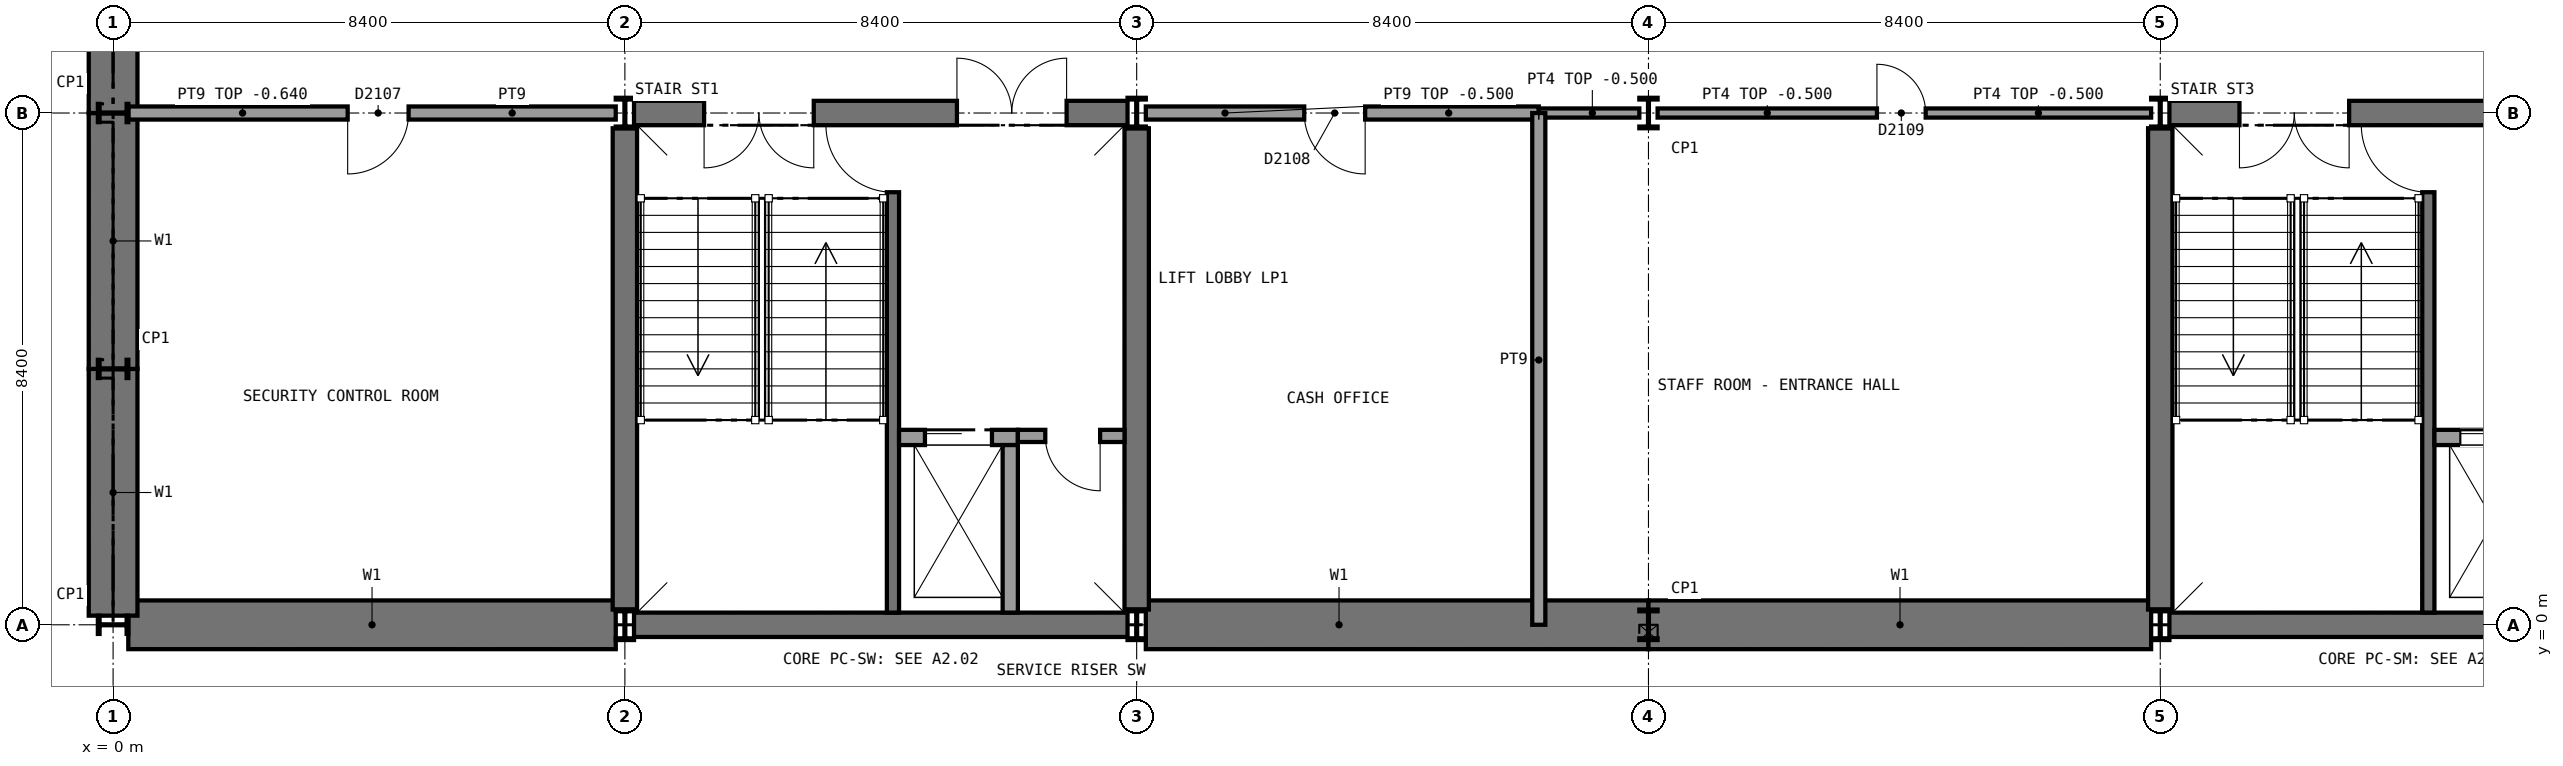
"""IFC4 building model, lengths in metres.
Left out: names, types, materials, properties, quantities, classifications, styles, units other than length and angle.
Written with IfcOpenShell. Run it as: python <this file> out.ifc"""

import sys

from ifc_helpers import new_model, si_unit, direction, frame, frame_2d, origin, origin_2d, place, context, subcontext, project, spatial, rectangle, i_section, extrude, element, fill, save


model = new_model("IFC4")
c1 = context("Model", 3, precision=1e-05, world=origin(), true_north=direction((0.0, 1.0)))
c2 = subcontext(c1, "Body", "Model", "MODEL_VIEW")
j1 = project(units=[si_unit("LENGTHUNIT", "METRE"), si_unit("PLANEANGLEUNIT", "RADIAN")], contexts=[c1])
p1 = place(None, origin())
s1 = spatial("IfcSite", under=j1, at=p1, CompositionType="ELEMENT")
p2 = place(p1, origin())
s2 = spatial("IfcBuilding", under=s1, at=p2, CompositionType="ELEMENT")
p3 = place(p2, frame((0.0, 0.0, -4.9)))
s3 = spatial("IfcBuildingStorey", under=s2, at=p3, CompositionType="ELEMENT", Elevation=-4.9)
p4 = place(p3, frame((0.25, 0.0, 0.0), z_axis=(0.0, 0.0, 1.0), x_axis=(1.0, 0.0, 0.0)))
e1 = element("IfcWall", 1, at=p4, inside=s3, PredefinedType="SOLIDWALL", context=c2, shape_type="SweptSolid", body=[
    extrude(rectangle(XDim=8.0, YDim=0.8, at=frame_2d((4.0, 0.0))), origin(), (0.0, 0.0, 1.0), 4.75),
])
p5 = place(p3, frame((16.95, 0.0, 0.0), z_axis=(0.0, 0.0, 1.0), x_axis=(1.0, 0.0, 0.0)))
e2 = element("IfcWall", 2, at=p5, inside=s3, PredefinedType="SOLIDWALL", context=c2, shape_type="SweptSolid", body=[
    extrude(rectangle(XDim=8.25, YDim=0.8, at=frame_2d((4.125, 0.0))), origin(), (0.0, 0.0, 1.0), 4.75),
])
p6 = place(p3, frame((25.2, 0.0, 0.0), z_axis=(0.0, 0.0, 1.0), x_axis=(1.0, 0.0, 0.0)))
e3 = element("IfcWall", 3, at=p6, inside=s3, PredefinedType="SOLIDWALL", context=c2, shape_type="SweptSolid", body=[
    extrude(rectangle(XDim=8.25, YDim=0.8, at=frame_2d((4.125, 0.0))), origin(), (0.0, 0.0, 1.0), 4.75),
])
p7 = place(p3, frame((0.0, 0.15, 0.0), z_axis=(0.0, 0.0, 1.0), x_axis=(0.0, 1.0, 0.0)))
e4 = element("IfcWall", 4, at=p7, inside=s3, PredefinedType="SOLIDWALL", context=c2, shape_type="SweptSolid", body=[
    extrude(rectangle(XDim=4.05, YDim=0.8, at=frame_2d((2.025, 0.0))), origin(), (0.0, 0.0, 1.0), 4.75),
])
p8 = place(p3, frame((0.0, 4.2, 0.0), z_axis=(0.0, 0.0, 1.0), x_axis=(0.0, 1.0, 0.0)))
e5 = element("IfcWall", 5, at=p8, inside=s3, PredefinedType="SOLIDWALL", context=c2, shape_type="SweptSolid", body=[
    extrude(rectangle(XDim=4.2, YDim=0.8, at=frame_2d((2.1, 0.0))), origin(), (0.0, 0.0, 1.0), 4.75),
])
p9 = place(p3, frame((0.0, 8.4, 0.0), z_axis=(0.0, 0.0, 1.0), x_axis=(0.0, 1.0, 0.0)))
e6 = element("IfcWall", 6, at=p9, inside=s3, PredefinedType="SOLIDWALL", context=c2, shape_type="SweptSolid", body=[
    extrude(rectangle(XDim=4.2, YDim=0.8, at=frame_2d((2.1, 0.0))), origin(), (0.0, 0.0, 1.0), 4.75),
])
p10 = place(p3, frame((8.55, 0.0, 0.0), z_axis=(0.0, 0.0, 1.0), x_axis=(1.0, 0.0, 0.0)))
e7 = element("IfcWall", 7, at=p10, inside=s3, PredefinedType="SHEAR", context=c2, shape_type="SweptSolid", body=[
    extrude(rectangle(XDim=8.1, YDim=0.4, at=frame_2d((4.05, 0.0))), origin(), (0.0, 0.0, 1.0), 4.75),
])
p11 = place(p3, frame((8.55, 8.4, 0.0), z_axis=(0.0, 0.0, 1.0), x_axis=(1.0, 0.0, 0.0)))
e8 = element("IfcWall", 8, at=p11, inside=s3, PredefinedType="SHEAR", context=c2, shape_type="SweptSolid", body=[
    extrude(rectangle(XDim=8.1, YDim=0.4, at=frame_2d((4.05, 0.0))), origin(), (0.0, 0.0, 1.0), 4.75),
])
p12 = place(p11, frame((1.15, 0.0, 0.0)))
e9 = element("IfcOpeningElement", 9, at=p12, cuts=e8, PredefinedType="OPENING", context=c2, shape_type="SweptSolid", body=[
    extrude(rectangle(XDim=1.8, YDim=2.1, at=frame_2d((0.9, 1.05))), frame((0.0, 0.21, 0.0), z_axis=(0.0, -1.0, 0.0), x_axis=(1.0, 0.0, 0.0)), (0.0, 0.0, 1.0), 0.42),
])
p13 = place(p11, frame((5.3, 0.0, 0.0)))
e10 = element("IfcOpeningElement", 10, at=p13, cuts=e8, PredefinedType="OPENING", context=c2, shape_type="SweptSolid", body=[
    extrude(rectangle(XDim=1.8, YDim=2.1, at=frame_2d((0.9, 1.05))), frame((0.0, 0.21, 0.0), z_axis=(0.0, -1.0, 0.0), x_axis=(1.0, 0.0, 0.0)), (0.0, 0.0, 1.0), 0.42),
])
for number, where, z_axis, x_axis in (
    (11, (8.4, 0.25, 0.0), (0.0, 0.0, 1.0), (0.0, 1.0, 0.0)),
    (12, (16.8, 0.25, 0.0), (0.0, 0.0, 1.0), (0.0, 1.0, 0.0)),
):
    element("IfcWall", number, at=place(p3, frame(where, z_axis=z_axis, x_axis=x_axis)), inside=s3, PredefinedType="SHEAR", context=c2, shape_type="SweptSolid", body=[
        extrude(rectangle(XDim=7.9, YDim=0.4, at=frame_2d((3.95, 0.0))), origin(), (0.0, 0.0, 1.0), 4.75),
    ])
p14 = place(p3, frame((33.75, 0.0, 0.0), z_axis=(0.0, 0.0, 1.0), x_axis=(1.0, 0.0, 0.0)))
e13 = element("IfcWall", 13, at=p14, inside=s3, PredefinedType="SHEAR", context=c2, shape_type="SweptSolid", body=[
    extrude(rectangle(XDim=8.1, YDim=0.4, at=frame_2d((4.05, 0.0))), origin(), (0.0, 0.0, 1.0), 4.75),
])
p15 = place(p3, frame((33.75, 8.4, 0.0), z_axis=(0.0, 0.0, 1.0), x_axis=(1.0, 0.0, 0.0)))
e14 = element("IfcWall", 14, at=p15, inside=s3, PredefinedType="SHEAR", context=c2, shape_type="SweptSolid", body=[
    extrude(rectangle(XDim=8.1, YDim=0.4, at=frame_2d((4.05, 0.0))), origin(), (0.0, 0.0, 1.0), 4.75),
])
p16 = place(p15, frame((1.15, 0.0, 0.0)))
e15 = element("IfcOpeningElement", 15, at=p16, cuts=e14, PredefinedType="OPENING", context=c2, shape_type="SweptSolid", body=[
    extrude(rectangle(XDim=1.8, YDim=2.1, at=frame_2d((0.9, 1.05))), frame((0.0, 0.21, 0.0), z_axis=(0.0, -1.0, 0.0), x_axis=(1.0, 0.0, 0.0)), (0.0, 0.0, 1.0), 0.42),
])
p17 = place(p15, frame((5.3, 0.0, 0.0)))
e16 = element("IfcOpeningElement", 16, at=p17, cuts=e14, PredefinedType="OPENING", context=c2, shape_type="SweptSolid", body=[
    extrude(rectangle(XDim=1.8, YDim=2.1, at=frame_2d((0.9, 1.05))), frame((0.0, 0.21, 0.0), z_axis=(0.0, -1.0, 0.0), x_axis=(1.0, 0.0, 0.0)), (0.0, 0.0, 1.0), 0.42),
])
p18 = place(p3, frame((33.6, 0.25, 0.0), z_axis=(0.0, 0.0, 1.0), x_axis=(0.0, 1.0, 0.0)))
e17 = element("IfcWall", 17, at=p18, inside=s3, PredefinedType="SHEAR", context=c2, shape_type="SweptSolid", body=[
    extrude(rectangle(XDim=7.9, YDim=0.4, at=frame_2d((3.95, 0.0))), origin(), (0.0, 0.0, 1.0), 4.75),
])
for number, where, z_axis, x_axis in (
    (18, (0.0, 0.0, 0.0), (0.0, 0.0, 1.0), (0.0, 1.0, 0.0)),
    (19, (0.0, 4.2, 0.0), (0.0, 0.0, 1.0), (0.0, 1.0, 0.0)),
    (20, (0.0, 8.4, 0.0), (0.0, 0.0, 1.0), (0.0, 1.0, 0.0)),
    (21, (8.4, 0.0, 0.0), (0.0, 0.0, 1.0), (1.0, 0.0, 0.0)),
    (22, (8.4, 8.4, 0.0), (0.0, 0.0, 1.0), (1.0, 0.0, 0.0)),
    (23, (16.8, 0.0, 0.0), (0.0, 0.0, 1.0), (1.0, 0.0, 0.0)),
    (24, (16.8, 8.4, 0.0), (0.0, 0.0, 1.0), (1.0, 0.0, 0.0)),
    (25, (25.2, 0.0, 0.0), (0.0, 0.0, 1.0), (1.0, 0.0, 0.0)),
    (26, (25.2, 8.4, 0.0), (0.0, 0.0, 1.0), (1.0, 0.0, 0.0)),
    (27, (33.6, 0.0, 0.0), (0.0, 0.0, 1.0), (1.0, 0.0, 0.0)),
    (28, (33.6, 8.4, 0.0), (0.0, 0.0, 1.0), (1.0, 0.0, 0.0)),
):
    element("IfcColumn", number, at=place(p3, frame(where, z_axis=z_axis, x_axis=x_axis)), inside=s3, PredefinedType="COLUMN", context=c2, shape_type="SweptSolid", body=[
        extrude(i_section(OverallWidth=0.3, OverallDepth=0.5, WebThickness=0.014, FlangeThickness=0.028, FilletRadius=0.027, at=origin_2d()), origin(), (0.0, 0.0, 1.0), 4.9),
    ])
p19 = place(p3, frame((0.25, 8.4, 0.0), z_axis=(0.0, 0.0, 1.0), x_axis=(1.0, 0.0, 0.0)))
e29 = element("IfcWall", 29, at=p19, inside=s3, PredefinedType="SOLIDWALL", context=c2, shape_type="SweptSolid", body=[
    extrude(rectangle(XDim=8.0, YDim=0.215, at=frame_2d((4.0, 0.0))), origin(), (0.0, 0.0, 1.0), 4.26),
])
p20 = place(p19, frame((3.6, 0.0, 0.0)))
e30 = element("IfcOpeningElement", 30, at=p20, cuts=e29, PredefinedType="OPENING", context=c2, shape_type="SweptSolid", body=[
    extrude(rectangle(XDim=1.0, YDim=2.1, at=frame_2d((0.5, 1.05))), frame((0.0, 0.118, 0.0), z_axis=(0.0, -1.0, 0.0), x_axis=(1.0, 0.0, 0.0)), (0.0, 0.0, 1.0), 0.235),
])
p21 = place(p3, frame((16.95, 8.4, 0.0), z_axis=(0.0, 0.0, 1.0), x_axis=(1.0, 0.0, 0.0)))
e31 = element("IfcWall", 31, at=p21, inside=s3, PredefinedType="SOLIDWALL", context=c2, shape_type="SweptSolid", body=[
    extrude(rectangle(XDim=6.45, YDim=0.215, at=frame_2d((3.225, 0.0))), origin(), (0.0, 0.0, 1.0), 4.4),
])
p22 = place(p21, frame((2.6, 0.0, 0.0)))
e32 = element("IfcOpeningElement", 32, at=p22, cuts=e31, PredefinedType="OPENING", context=c2, shape_type="SweptSolid", body=[
    extrude(rectangle(XDim=1.0, YDim=2.1, at=frame_2d((0.5, 1.05))), frame((0.0, 0.118, 0.0), z_axis=(0.0, -1.0, 0.0), x_axis=(1.0, 0.0, 0.0)), (0.0, 0.0, 1.0), 0.235),
])
p23 = place(p3, frame((23.4, 8.4, 0.0), z_axis=(0.0, 0.0, 1.0), x_axis=(1.0, 0.0, 0.0)))
e33 = element("IfcWall", 33, at=p23, inside=s3, PredefinedType="SOLIDWALL", context=c2, shape_type="SweptSolid", body=[
    extrude(rectangle(XDim=1.65, YDim=0.15, at=frame_2d((0.825, 0.0))), origin(), (0.0, 0.0, 1.0), 4.4),
])
p24 = place(p3, frame((25.35, 8.4, 0.0), z_axis=(0.0, 0.0, 1.0), x_axis=(1.0, 0.0, 0.0)))
e34 = element("IfcWall", 34, at=p24, inside=s3, PredefinedType="SOLIDWALL", context=c2, shape_type="SweptSolid", body=[
    extrude(rectangle(XDim=8.1, YDim=0.15, at=frame_2d((4.05, 0.0))), origin(), (0.0, 0.0, 1.0), 4.4),
])
p25 = place(p24, frame((3.6, 0.0, 0.0)))
e35 = element("IfcOpeningElement", 35, at=p25, cuts=e34, PredefinedType="OPENING", context=c2, shape_type="SweptSolid", body=[
    extrude(rectangle(XDim=0.8, YDim=2.1, at=frame_2d((0.4, 1.05))), frame((0.0, 0.085, 0.0), z_axis=(0.0, -1.0, 0.0), x_axis=(1.0, 0.0, 0.0)), (0.0, 0.0, 1.0), 0.17),
])
p26 = place(p3, frame((23.4, 0.0, 0.0), z_axis=(0.0, 0.0, 1.0), x_axis=(0.0, 1.0, 0.0)))
e36 = element("IfcWall", 36, at=p26, inside=s3, PredefinedType="SOLIDWALL", context=c2, shape_type="SweptSolid", body=[
    extrude(rectangle(XDim=8.4, YDim=0.215, at=frame_2d((4.2, 0.0))), origin(), (0.0, 0.0, 1.0), 4.75),
])
p27 = place(p3, frame((12.8, 0.2, 0.0), z_axis=(0.0, 0.0, 1.0), x_axis=(0.0, 1.0, 0.0)))
e37 = element("IfcWall", 37, at=p27, inside=s3, PredefinedType="SHEAR", context=c2, shape_type="SweptSolid", body=[
    extrude(rectangle(XDim=8.0, YDim=0.2, at=frame_2d((4.0, 0.0))), origin(), (0.0, 0.0, 1.0), 4.75),
])
p28 = place(p27, frame((6.9, 0.0, 0.0)))
e38 = element("IfcOpeningElement", 38, at=p28, cuts=e37, PredefinedType="OPENING", context=c2, shape_type="SweptSolid", body=[
    extrude(rectangle(XDim=1.11, YDim=2.1, at=frame_2d((0.555, 1.05))), frame((0.0, 0.11, 0.0), z_axis=(0.0, -1.0, 0.0), x_axis=(1.0, 0.0, 0.0)), (0.0, 0.0, 1.0), 0.22),
])
p29 = place(p3, frame((12.9, 3.075, 0.0), z_axis=(0.0, 0.0, 1.0), x_axis=(1.0, 0.0, 0.0)))
e39 = element("IfcWall", 39, at=p29, inside=s3, PredefinedType="SOLIDWALL", context=c2, shape_type="SweptSolid", body=[
    extrude(rectangle(XDim=1.95, YDim=0.25, at=frame_2d((0.975, 0.0))), origin(), (0.0, 0.0, 1.0), 4.9),
])
p30 = place(p29, frame((0.425, 0.0, 0.0)))
e40 = element("IfcOpeningElement", 40, at=p30, cuts=e39, PredefinedType="OPENING", context=c2, shape_type="SweptSolid", body=[
    extrude(rectangle(XDim=1.1, YDim=2.1, at=frame_2d((0.55, 1.05))), frame((0.0, 0.135, 0.0), z_axis=(0.0, -1.0, 0.0), x_axis=(1.0, 0.0, 0.0)), (0.0, 0.0, 1.0), 0.27),
])
p31 = place(p3, frame((14.725, 0.2, 0.0), z_axis=(0.0, 0.0, 1.0), x_axis=(0.0, 1.0, 0.0)))
e41 = element("IfcWall", 41, at=p31, inside=s3, PredefinedType="SOLIDWALL", context=c2, shape_type="SweptSolid", body=[
    extrude(rectangle(XDim=2.75, YDim=0.25, at=frame_2d((1.375, 0.0))), origin(), (0.0, 0.0, 1.0), 4.9),
])
p32 = place(p3, frame((14.85, 3.1, 0.0), z_axis=(0.0, 0.0, 1.0), x_axis=(1.0, 0.0, 0.0)))
e42 = element("IfcWall", 42, at=p32, inside=s3, PredefinedType="PARTITIONING", context=c2, shape_type="SweptSolid", body=[
    extrude(rectangle(XDim=1.75, YDim=0.2, at=frame_2d((0.875, 0.0))), origin(), (0.0, 0.0, 1.0), 4.75),
])
p33 = place(p32, frame((0.45, 0.0, 0.0)))
e43 = element("IfcOpeningElement", 43, at=p33, cuts=e42, PredefinedType="OPENING", context=c2, shape_type="SweptSolid", body=[
    extrude(rectangle(XDim=0.9, YDim=2.1, at=frame_2d((0.45, 1.05))), frame((0.0, 0.11, 0.0), z_axis=(0.0, -1.0, 0.0), x_axis=(1.0, 0.0, 0.0)), (0.0, 0.0, 1.0), 0.22),
])
p34 = place(p3, frame((38.0, 0.2, 0.0), z_axis=(0.0, 0.0, 1.0), x_axis=(0.0, 1.0, 0.0)))
e44 = element("IfcWall", 44, at=p34, inside=s3, PredefinedType="SHEAR", context=c2, shape_type="SweptSolid", body=[
    extrude(rectangle(XDim=8.0, YDim=0.2, at=frame_2d((4.0, 0.0))), origin(), (0.0, 0.0, 1.0), 4.75),
])
p35 = place(p34, frame((6.9, 0.0, 0.0)))
e45 = element("IfcOpeningElement", 45, at=p35, cuts=e44, PredefinedType="OPENING", context=c2, shape_type="SweptSolid", body=[
    extrude(rectangle(XDim=1.11, YDim=2.1, at=frame_2d((0.555, 1.05))), frame((0.0, 0.11, 0.0), z_axis=(0.0, -1.0, 0.0), x_axis=(1.0, 0.0, 0.0)), (0.0, 0.0, 1.0), 0.22),
])
p36 = place(p3, frame((38.1, 3.075, 0.0), z_axis=(0.0, 0.0, 1.0), x_axis=(1.0, 0.0, 0.0)))
e46 = element("IfcWall", 46, at=p36, inside=s3, PredefinedType="SOLIDWALL", context=c2, shape_type="SweptSolid", body=[
    extrude(rectangle(XDim=1.95, YDim=0.25, at=frame_2d((0.975, 0.0))), origin(), (0.0, 0.0, 1.0), 4.9),
])
p37 = place(p36, frame((0.425, 0.0, 0.0)))
e47 = element("IfcOpeningElement", 47, at=p37, cuts=e46, PredefinedType="OPENING", context=c2, shape_type="SweptSolid", body=[
    extrude(rectangle(XDim=1.1, YDim=2.1, at=frame_2d((0.55, 1.05))), frame((0.0, 0.135, 0.0), z_axis=(0.0, -1.0, 0.0), x_axis=(1.0, 0.0, 0.0)), (0.0, 0.0, 1.0), 0.27),
])
p38 = place(p20, frame((1.0, 0.0, 0.0), z_axis=(0.0, 0.0, 1.0), x_axis=(-1.0, 0.0, 0.0)))
e48 = element("IfcDoor", 48, at=p38, inside=s3, OperationType="SINGLE_SWING_RIGHT", PredefinedType="DOOR", context=c2, shape_type="SweptSolid", body=[
    extrude(rectangle(XDim=1.0, YDim=2.1, at=frame_2d((0.5, 1.05))), frame((0.0, 0.025, 0.0), z_axis=(0.0, -1.0, 0.0), x_axis=(1.0, 0.0, 0.0)), (0.0, 0.0, 1.0), 0.05),
])
fill(e30, e48)
p39 = place(p22, frame((1.0, 0.0, 0.0), z_axis=(0.0, 0.0, 1.0), x_axis=(-1.0, 0.0, 0.0)))
e49 = element("IfcDoor", 49, at=p39, inside=s3, OperationType="SINGLE_SWING_LEFT", PredefinedType="DOOR", context=c2, shape_type="SweptSolid", body=[
    extrude(rectangle(XDim=1.0, YDim=2.1, at=frame_2d((0.5, 1.05))), frame((0.0, 0.025, 0.0), z_axis=(0.0, -1.0, 0.0), x_axis=(1.0, 0.0, 0.0)), (0.0, 0.0, 1.0), 0.05),
])
fill(e32, e49)
p40 = place(p25, origin())
e50 = element("IfcDoor", 50, at=p40, inside=s3, OperationType="SINGLE_SWING_LEFT", PredefinedType="DOOR", context=c2, shape_type="SweptSolid", body=[
    extrude(rectangle(XDim=0.8, YDim=2.1, at=frame_2d((0.4, 1.05))), frame((0.0, 0.025, 0.0), z_axis=(0.0, -1.0, 0.0), x_axis=(1.0, 0.0, 0.0)), (0.0, 0.0, 1.0), 0.05),
])
fill(e35, e50)
p41 = place(p28, origin())
e51 = element("IfcDoor", 51, at=p41, inside=s3, OperationType="SINGLE_SWING_RIGHT", PredefinedType="DOOR", context=c2, shape_type="SweptSolid", body=[
    extrude(rectangle(XDim=1.1, YDim=2.1, at=frame_2d((0.55, 1.05))), frame((0.0, 0.025, 0.0), z_axis=(0.0, -1.0, 0.0), x_axis=(1.0, 0.0, 0.0)), (0.0, 0.0, 1.0), 0.05),
])
fill(e38, e51)
p42 = place(p30, origin())
e52 = element("IfcDoor", 52, at=p42, inside=s3, OperationType="SLIDING_TO_LEFT", PredefinedType="DOOR", context=c2, shape_type="SweptSolid", body=[
    extrude(rectangle(XDim=1.1, YDim=2.1, at=frame_2d((0.55, 1.05))), frame((0.0, 0.025, 0.0), z_axis=(0.0, -1.0, 0.0), x_axis=(1.0, 0.0, 0.0)), (0.0, 0.0, 1.0), 0.05),
])
fill(e40, e52)
p43 = place(p33, frame((0.9, 0.0, 0.0), z_axis=(0.0, 0.0, 1.0), x_axis=(-1.0, 0.0, 0.0)))
e53 = element("IfcDoor", 53, at=p43, inside=s3, OperationType="SINGLE_SWING_LEFT", PredefinedType="DOOR", context=c2, shape_type="SweptSolid", body=[
    extrude(rectangle(XDim=0.9, YDim=2.1, at=frame_2d((0.45, 1.05))), frame((0.0, 0.025, 0.0), z_axis=(0.0, -1.0, 0.0), x_axis=(1.0, 0.0, 0.0)), (0.0, 0.0, 1.0), 0.05),
])
fill(e43, e53)
p44 = place(p12, frame((1.8, 0.0, 0.0), z_axis=(0.0, 0.0, 1.0), x_axis=(-1.0, 0.0, 0.0)))
e54 = element("IfcDoor", 54, at=p44, inside=s3, OperationType="DOUBLE_DOOR_SINGLE_SWING", PredefinedType="DOOR", context=c2, shape_type="SweptSolid", body=[
    extrude(rectangle(XDim=1.8, YDim=2.1, at=frame_2d((0.9, 1.05))), frame((0.0, 0.025, 0.0), z_axis=(0.0, -1.0, 0.0), x_axis=(1.0, 0.0, 0.0)), (0.0, 0.0, 1.0), 0.05),
])
fill(e9, e54)
p45 = place(p13, origin())
e55 = element("IfcDoor", 55, at=p45, inside=s3, OperationType="DOUBLE_DOOR_SINGLE_SWING", PredefinedType="DOOR", context=c2, shape_type="SweptSolid", body=[
    extrude(rectangle(XDim=1.8, YDim=2.1, at=frame_2d((0.9, 1.05))), frame((0.0, 0.025, 0.0), z_axis=(0.0, -1.0, 0.0), x_axis=(1.0, 0.0, 0.0)), (0.0, 0.0, 1.0), 0.05),
])
fill(e10, e55)
p46 = place(p35, origin())
e56 = element("IfcDoor", 56, at=p46, inside=s3, OperationType="SINGLE_SWING_RIGHT", PredefinedType="DOOR", context=c2, shape_type="SweptSolid", body=[
    extrude(rectangle(XDim=1.1, YDim=2.1, at=frame_2d((0.55, 1.05))), frame((0.0, 0.025, 0.0), z_axis=(0.0, -1.0, 0.0), x_axis=(1.0, 0.0, 0.0)), (0.0, 0.0, 1.0), 0.05),
])
fill(e45, e56)
p47 = place(p37, origin())
e57 = element("IfcDoor", 57, at=p47, inside=s3, OperationType="SLIDING_TO_LEFT", PredefinedType="DOOR", context=c2, shape_type="SweptSolid", body=[
    extrude(rectangle(XDim=1.1, YDim=2.1, at=frame_2d((0.55, 1.05))), frame((0.0, 0.025, 0.0), z_axis=(0.0, -1.0, 0.0), x_axis=(1.0, 0.0, 0.0)), (0.0, 0.0, 1.0), 0.05),
])
fill(e47, e57)
p48 = place(p16, frame((1.8, 0.0, 0.0), z_axis=(0.0, 0.0, 1.0), x_axis=(-1.0, 0.0, 0.0)))
e58 = element("IfcDoor", 58, at=p48, inside=s3, OperationType="DOUBLE_DOOR_SINGLE_SWING", PredefinedType="DOOR", context=c2, shape_type="SweptSolid", body=[
    extrude(rectangle(XDim=1.8, YDim=2.1, at=frame_2d((0.9, 1.05))), frame((0.0, 0.025, 0.0), z_axis=(0.0, -1.0, 0.0), x_axis=(1.0, 0.0, 0.0)), (0.0, 0.0, 1.0), 0.05),
])
fill(e15, e58)
save(model, sys.argv[1])
